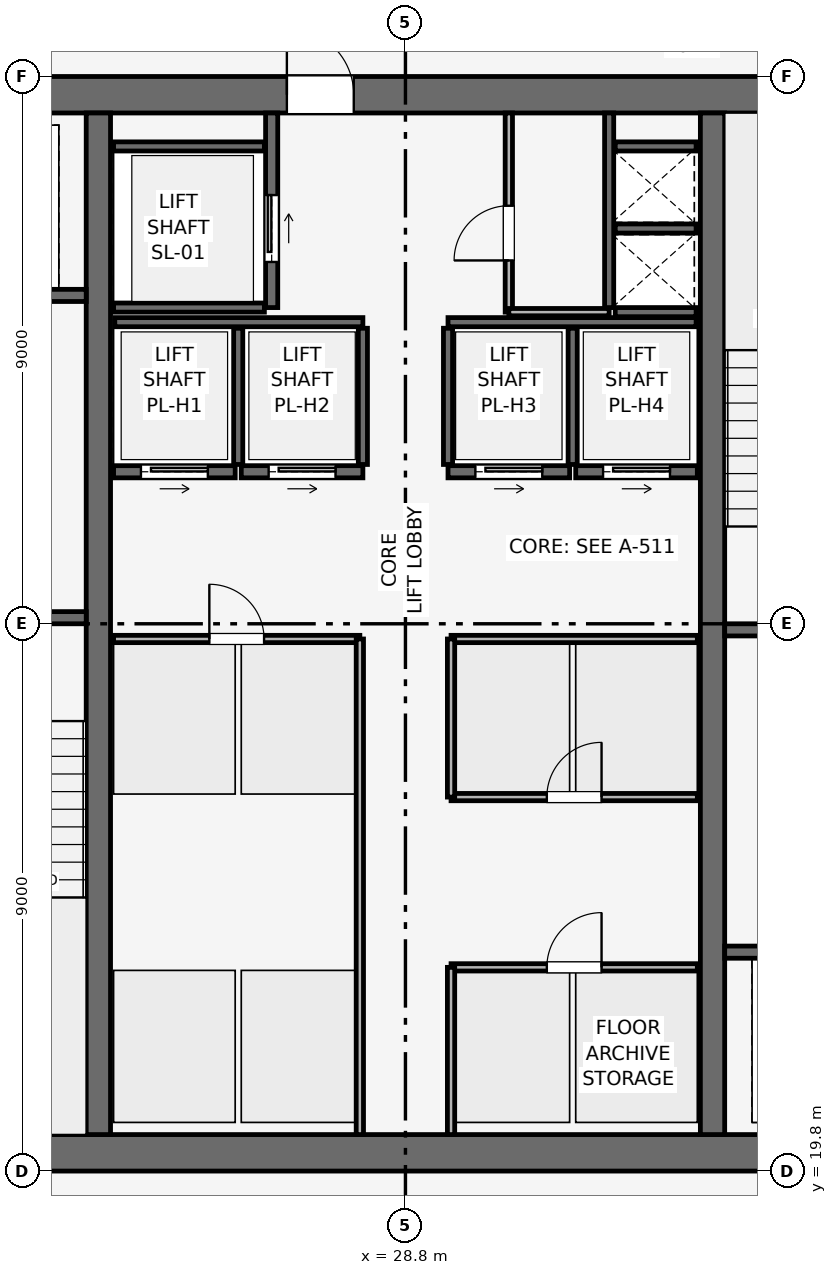
"""IFC4 building model, lengths in metres.
Left out: names, types, materials, properties, quantities, classifications, styles, units other than length and angle.
Written with IfcOpenShell. Run it as: python <this file> out.ifc"""

import sys

from ifc_helpers import new_model, si_unit, direction, frame, frame_2d, origin, place, context, subcontext, project, spatial, rectangle, extrude, element, fill, save


model = new_model("IFC4")
c1 = context("Model", 3, precision=1e-05, world=origin(), true_north=direction((0.0, 1.0)))
c2 = subcontext(c1, "Body", "Model", "MODEL_VIEW")
j1 = project(units=[si_unit("LENGTHUNIT", "METRE"), si_unit("PLANEANGLEUNIT", "RADIAN")], contexts=[c1])
p1 = place(None, origin())
s1 = spatial("IfcSite", under=j1, at=p1, CompositionType="ELEMENT")
p2 = place(p1, origin())
s2 = spatial("IfcBuilding", under=s1, at=p2, CompositionType="ELEMENT")
p3 = place(p2, frame((0.0, 0.0, 303.0)))
s3 = spatial("IfcBuildingStorey", under=s2, at=p3, CompositionType="ELEMENT", Elevation=303.0)
p4 = place(p3, frame((19.8, 20.1, 0.0), z_axis=(0.0, 0.0, 1.0), x_axis=(1.0, 0.0, 0.0)))
e1 = element("IfcWall", 1, at=p4, inside=s3, PredefinedType="SHEAR", context=c2, shape_type="SweptSolid", body=[
    extrude(rectangle(XDim=18.0, YDim=0.6, at=frame_2d((9.0, 0.0))), origin(), (0.0, 0.0, 1.0), 3.75),
])
p5 = place(p3, frame((19.8, 37.5, 0.0), z_axis=(0.0, 0.0, 1.0), x_axis=(1.0, 0.0, 0.0)))
e2 = element("IfcWall", 2, at=p5, inside=s3, PredefinedType="SHEAR", context=c2, shape_type="SweptSolid", body=[
    extrude(rectangle(XDim=18.0, YDim=0.6, at=frame_2d((9.0, 0.0))), origin(), (0.0, 0.0, 1.0), 3.75),
])
p6 = place(p5, frame((7.05, 0.0, 0.0)))
e3 = element("IfcOpeningElement", 3, at=p6, cuts=e2, PredefinedType="OPENING", context=c2, shape_type="SweptSolid", body=[
    extrude(rectangle(XDim=1.1, YDim=2.15, at=frame_2d((0.55, 1.075))), frame((0.0, 0.31, 0.0), z_axis=(0.0, -1.0, 0.0), x_axis=(1.0, 0.0, 0.0)), (0.0, 0.0, 1.0), 0.62),
])
for number, where, z_axis, x_axis in (
    (4, (23.75, 20.4, 0.0), (0.0, 0.0, 1.0), (0.0, 1.0, 0.0)),
    (5, (33.85, 20.4, 0.0), (0.0, 0.0, 1.0), (0.0, 1.0, 0.0)),
):
    element("IfcWall", number, at=place(p3, frame(where, z_axis=z_axis, x_axis=x_axis)), inside=s3, PredefinedType="SHEAR", context=c2, shape_type="SweptSolid", body=[
        extrude(rectangle(XDim=16.8, YDim=0.4, at=frame_2d((8.4, 0.0))), origin(), (0.0, 0.0, 1.0), 3.75),
    ])
p7 = place(p3, frame((20.4, 28.9, 0.0), z_axis=(0.0, 0.0, 1.0), x_axis=(1.0, 0.0, 0.0)))
e6 = element("IfcWall", 6, at=p7, inside=s3, PredefinedType="SHEAR", context=c2, shape_type="SweptSolid", body=[
    extrude(rectangle(XDim=3.15, YDim=0.2, at=frame_2d((1.575, 0.0))), origin(), (0.0, 0.0, 1.0), 3.51),
])
p8 = place(p7, frame((0.8, 0.0, 0.0)))
e7 = element("IfcOpeningElement", 7, at=p8, cuts=e6, PredefinedType="OPENING", context=c2, shape_type="SweptSolid", body=[
    extrude(rectangle(XDim=1.0, YDim=2.1, at=frame_2d((0.5, 1.05))), frame((0.0, 0.11, 0.0), z_axis=(0.0, -1.0, 0.0), x_axis=(1.0, 0.0, 0.0)), (0.0, 0.0, 1.0), 0.22),
])
p9 = place(p3, frame((34.05, 28.7, 0.0), z_axis=(0.0, 0.0, 1.0), x_axis=(1.0, 0.0, 0.0)))
e8 = element("IfcWall", 8, at=p9, inside=s3, PredefinedType="SHEAR", context=c2, shape_type="SweptSolid", body=[
    extrude(rectangle(XDim=3.15, YDim=0.2, at=frame_2d((1.575, 0.0))), origin(), (0.0, 0.0, 1.0), 3.51),
])
p10 = place(p9, frame((0.8, 0.0, 0.0)))
e9 = element("IfcOpeningElement", 9, at=p10, cuts=e8, PredefinedType="OPENING", context=c2, shape_type="SweptSolid", body=[
    extrude(rectangle(XDim=1.0, YDim=2.1, at=frame_2d((0.5, 1.05))), frame((0.0, 0.11, 0.0), z_axis=(0.0, -1.0, 0.0), x_axis=(1.0, 0.0, 0.0)), (0.0, 0.0, 1.0), 0.22),
])
p11 = place(p3, frame((32.15, 34.0, 0.0), z_axis=(0.0, 0.0, 1.0), x_axis=(0.0, 1.0, 0.0)))
e10 = element("IfcWall", 10, at=p11, inside=s3, PredefinedType="SHEAR", context=c2, shape_type="SweptSolid", body=[
    extrude(rectangle(XDim=3.2, YDim=0.15, at=frame_2d((1.6, 0.0))), origin(), (0.0, 0.0, 1.0), 3.51),
])
for number, where, z_axis, x_axis in (
    (11, (32.25, 33.925, 0.0), (0.0, 0.0, 1.0), (1.0, 0.0, 0.0)),
    (12, (32.25, 35.3, 0.0), (0.0, 0.0, 1.0), (1.0, 0.0, 0.0)),
):
    element("IfcWall", number, at=place(p3, frame(where, z_axis=z_axis, x_axis=x_axis)), inside=s3, PredefinedType="SHEAR", context=c2, shape_type="SweptSolid", body=[
        extrude(rectangle(XDim=1.33, YDim=0.15, at=frame_2d((0.665, 0.0))), origin(), (0.0, 0.0, 1.0), 3.51),
    ])
p12 = place(p3, frame((20.5, 34.2, 0.0), z_axis=(0.0, 0.0, 1.0), x_axis=(1.0, 0.0, 0.0)))
e13 = element("IfcWall", 13, at=p12, inside=s3, PredefinedType="SHEAR", context=c2, shape_type="SweptSolid", body=[
    extrude(rectangle(XDim=3.05, YDim=0.2, at=frame_2d((1.525, 0.0))), origin(), (0.0, 0.0, 1.0), 3.51),
])
p13 = place(p12, frame((0.75, 0.0, 0.0)))
e14 = element("IfcOpeningElement", 14, at=p13, cuts=e13, PredefinedType="OPENING", context=c2, shape_type="SweptSolid", body=[
    extrude(rectangle(XDim=1.1, YDim=2.15, at=frame_2d((0.55, 1.075))), frame((0.0, 0.11, 0.0), z_axis=(0.0, -1.0, 0.0), x_axis=(1.0, 0.0, 0.0)), (0.0, 0.0, 1.0), 0.22),
])
p14 = place(p3, frame((34.05, 23.4, 0.0), z_axis=(0.0, 0.0, 1.0), x_axis=(1.0, 0.0, 0.0)))
e15 = element("IfcWall", 15, at=p14, inside=s3, PredefinedType="SHEAR", context=c2, shape_type="SweptSolid", body=[
    extrude(rectangle(XDim=3.05, YDim=0.2, at=frame_2d((1.525, 0.0))), origin(), (0.0, 0.0, 1.0), 3.51),
])
p15 = place(p14, frame((1.2, 0.0, 0.0)))
e16 = element("IfcOpeningElement", 16, at=p15, cuts=e15, PredefinedType="OPENING", context=c2, shape_type="SweptSolid", body=[
    extrude(rectangle(XDim=1.1, YDim=2.15, at=frame_2d((0.55, 1.075))), frame((0.0, 0.11, 0.0), z_axis=(0.0, -1.0, 0.0), x_axis=(1.0, 0.0, 0.0)), (0.0, 0.0, 1.0), 0.22),
])
p16 = place(p3, frame((26.6, 34.0, 0.0), z_axis=(0.0, 0.0, 1.0), x_axis=(0.0, 1.0, 0.0)))
e17 = element("IfcWall", 17, at=p16, inside=s3, PredefinedType="SHEAR", context=c2, shape_type="SweptSolid", body=[
    extrude(rectangle(XDim=3.2, YDim=0.2, at=frame_2d((1.6, 0.0))), origin(), (0.0, 0.0, 1.0), 3.51),
])
p17 = place(p16, frame((0.75, 0.0, 0.0)))
e18 = element("IfcOpeningElement", 18, at=p17, cuts=e17, PredefinedType="OPENING", context=c2, shape_type="SweptSolid", body=[
    extrude(rectangle(XDim=1.1, YDim=2.15, at=frame_2d((0.55, 1.075))), frame((0.0, 0.11, 0.0), z_axis=(0.0, -1.0, 0.0), x_axis=(1.0, 0.0, 0.0)), (0.0, 0.0, 1.0), 0.22),
])
for number, where, z_axis, x_axis in (
    (19, (24.0, 34.0, 0.0), (0.0, 0.0, 1.0), (1.0, 0.0, 0.0)),
    (20, (24.0, 36.65, 0.0), (0.0, 0.0, 1.0), (1.0, 0.0, 0.0)),
):
    element("IfcWall", number, at=place(p3, frame(where, z_axis=z_axis, x_axis=x_axis)), inside=s3, PredefinedType="SHEAR", context=c2, shape_type="SweptSolid", body=[
        extrude(rectangle(XDim=2.48, YDim=0.15, at=frame_2d((1.24, 0.0))), origin(), (0.0, 0.0, 1.0), 3.51),
    ])
p18 = place(p3, frame((24.0, 31.3, 0.0), z_axis=(0.0, 0.0, 1.0), x_axis=(1.0, 0.0, 0.0)))
e21 = element("IfcWall", 21, at=p18, inside=s3, PredefinedType="SHEAR", context=c2, shape_type="SweptSolid", body=[
    extrude(rectangle(XDim=2.0, YDim=0.2, at=frame_2d((1.0, 0.0))), origin(), (0.0, 0.0, 1.0), 3.51),
])
p19 = place(p18, frame((0.45, 0.0, 0.0)))
e22 = element("IfcOpeningElement", 22, at=p19, cuts=e21, PredefinedType="OPENING", context=c2, shape_type="SweptSolid", body=[
    extrude(rectangle(XDim=1.1, YDim=2.15, at=frame_2d((0.55, 1.075))), frame((0.0, 0.11, 0.0), z_axis=(0.0, -1.0, 0.0), x_axis=(1.0, 0.0, 0.0)), (0.0, 0.0, 1.0), 0.22),
])
p20 = place(p3, frame((26.1, 31.3, 0.0), z_axis=(0.0, 0.0, 1.0), x_axis=(1.0, 0.0, 0.0)))
e23 = element("IfcWall", 23, at=p20, inside=s3, PredefinedType="SHEAR", context=c2, shape_type="SweptSolid", body=[
    extrude(rectangle(XDim=2.0, YDim=0.2, at=frame_2d((1.0, 0.0))), origin(), (0.0, 0.0, 1.0), 3.51),
])
p21 = place(p20, frame((0.45, 0.0, 0.0)))
e24 = element("IfcOpeningElement", 24, at=p21, cuts=e23, PredefinedType="OPENING", context=c2, shape_type="SweptSolid", body=[
    extrude(rectangle(XDim=1.1, YDim=2.15, at=frame_2d((0.55, 1.075))), frame((0.0, 0.11, 0.0), z_axis=(0.0, -1.0, 0.0), x_axis=(1.0, 0.0, 0.0)), (0.0, 0.0, 1.0), 0.22),
])
p22 = place(p3, frame((29.5, 31.3, 0.0), z_axis=(0.0, 0.0, 1.0), x_axis=(1.0, 0.0, 0.0)))
e25 = element("IfcWall", 25, at=p22, inside=s3, PredefinedType="SHEAR", context=c2, shape_type="SweptSolid", body=[
    extrude(rectangle(XDim=2.0, YDim=0.2, at=frame_2d((1.0, 0.0))), origin(), (0.0, 0.0, 1.0), 3.51),
])
p23 = place(p22, frame((0.45, 0.0, 0.0)))
e26 = element("IfcOpeningElement", 26, at=p23, cuts=e25, PredefinedType="OPENING", context=c2, shape_type="SweptSolid", body=[
    extrude(rectangle(XDim=1.1, YDim=2.15, at=frame_2d((0.55, 1.075))), frame((0.0, 0.11, 0.0), z_axis=(0.0, -1.0, 0.0), x_axis=(1.0, 0.0, 0.0)), (0.0, 0.0, 1.0), 0.22),
])
p24 = place(p3, frame((31.6, 31.3, 0.0), z_axis=(0.0, 0.0, 1.0), x_axis=(1.0, 0.0, 0.0)))
e27 = element("IfcWall", 27, at=p24, inside=s3, PredefinedType="SHEAR", context=c2, shape_type="SweptSolid", body=[
    extrude(rectangle(XDim=2.0, YDim=0.2, at=frame_2d((1.0, 0.0))), origin(), (0.0, 0.0, 1.0), 3.51),
])
p25 = place(p24, frame((0.45, 0.0, 0.0)))
e28 = element("IfcOpeningElement", 28, at=p25, cuts=e27, PredefinedType="OPENING", context=c2, shape_type="SweptSolid", body=[
    extrude(rectangle(XDim=1.1, YDim=2.15, at=frame_2d((0.55, 1.075))), frame((0.0, 0.11, 0.0), z_axis=(0.0, -1.0, 0.0), x_axis=(1.0, 0.0, 0.0)), (0.0, 0.0, 1.0), 0.22),
])
p26 = place(p3, frame((32.25, 36.65, 0.0), z_axis=(0.0, 0.0, 1.0), x_axis=(1.0, 0.0, 0.0)))
e29 = element("IfcWall", 29, at=p26, inside=s3, PredefinedType="SHEAR", context=c2, shape_type="SweptSolid", body=[
    extrude(rectangle(XDim=1.33, YDim=0.15, at=frame_2d((0.665, 0.0))), origin(), (0.0, 0.0, 1.0), 3.51),
])
for number, where, z_axis, x_axis in (
    (30, (24.02, 33.76, 0.0), (0.0, 0.0, 1.0), (1.0, 0.0, 0.0)),
    (31, (29.5, 33.76, 0.0), (0.0, 0.0, 1.0), (1.0, 0.0, 0.0)),
):
    element("IfcWall", number, at=place(p3, frame(where, z_axis=z_axis, x_axis=x_axis)), inside=s3, PredefinedType="SHEAR", context=c2, shape_type="SweptSolid", body=[
        extrude(rectangle(XDim=4.08, YDim=0.15, at=frame_2d((2.04, 0.0))), origin(), (0.0, 0.0, 1.0), 3.51),
    ])
for number, where, z_axis, x_axis in (
    (32, (26.05, 31.42, 0.0), (0.0, 0.0, 1.0), (0.0, 1.0, 0.0)),
    (33, (28.1, 31.42, 0.0), (0.0, 0.0, 1.0), (0.0, 1.0, 0.0)),
    (34, (29.5, 31.42, 0.0), (0.0, 0.0, 1.0), (0.0, 1.0, 0.0)),
    (35, (31.55, 31.42, 0.0), (0.0, 0.0, 1.0), (0.0, 1.0, 0.0)),
):
    element("IfcWall", number, at=place(p3, frame(where, z_axis=z_axis, x_axis=x_axis)), inside=s3, PredefinedType="SHEAR", context=c2, shape_type="SweptSolid", body=[
        extrude(rectangle(XDim=2.24, YDim=0.15, at=frame_2d((1.12, 0.0))), origin(), (0.0, 0.0, 1.0), 3.51),
    ])
p27 = place(p3, frame((30.5, 33.925, 0.0), z_axis=(0.0, 0.0, 1.0), x_axis=(0.0, 1.0, 0.0)))
e36 = element("IfcWall", 36, at=p27, inside=s3, PredefinedType="PARTITIONING", context=c2, shape_type="SweptSolid", body=[
    extrude(rectangle(XDim=3.275, YDim=0.12, at=frame_2d((1.637, 0.0))), origin(), (0.0, 0.0, 1.0), 3.51),
])
p28 = place(p27, frame((0.85, 0.0, 0.0)))
e37 = element("IfcOpeningElement", 37, at=p28, cuts=e36, PredefinedType="OPENING", context=c2, shape_type="SweptSolid", body=[
    extrude(rectangle(XDim=0.9, YDim=2.1, at=frame_2d((0.45, 1.05))), frame((0.0, 0.07, 0.0), z_axis=(0.0, -1.0, 0.0), x_axis=(1.0, 0.0, 0.0)), (0.0, 0.0, 1.0), 0.14),
])
p29 = place(p3, frame((30.5, 33.925, 0.0), z_axis=(0.0, 0.0, 1.0), x_axis=(1.0, 0.0, 0.0)))
e38 = element("IfcWall", 38, at=p29, inside=s3, PredefinedType="PARTITIONING", context=c2, shape_type="SweptSolid", body=[
    extrude(rectangle(XDim=1.65, YDim=0.12, at=frame_2d((0.825, 0.0))), origin(), (0.0, 0.0, 1.0), 3.51),
])
p30 = place(p3, frame((24.0, 28.55, 0.0), z_axis=(0.0, 0.0, 1.0), x_axis=(1.0, 0.0, 0.0)))
e39 = element("IfcWall", 39, at=p30, inside=s3, PredefinedType="PARTITIONING", context=c2, shape_type="SweptSolid", body=[
    extrude(rectangle(XDim=4.05, YDim=0.12, at=frame_2d((2.025, 0.0))), origin(), (0.0, 0.0, 1.0), 3.51),
])
p31 = place(p30, frame((1.575, 0.0, 0.0)))
e40 = element("IfcOpeningElement", 40, at=p31, cuts=e39, PredefinedType="OPENING", context=c2, shape_type="SweptSolid", body=[
    extrude(rectangle(XDim=0.9, YDim=2.1, at=frame_2d((0.45, 1.05))), frame((0.0, 0.07, 0.0), z_axis=(0.0, -1.0, 0.0), x_axis=(1.0, 0.0, 0.0)), (0.0, 0.0, 1.0), 0.14),
])
p32 = place(p3, frame((28.05, 20.4, 0.0), z_axis=(0.0, 0.0, 1.0), x_axis=(0.0, 1.0, 0.0)))
e41 = element("IfcWall", 41, at=p32, inside=s3, PredefinedType="PARTITIONING", context=c2, shape_type="SweptSolid", body=[
    extrude(rectangle(XDim=8.15, YDim=0.12, at=frame_2d((4.075, 0.0))), origin(), (0.0, 0.0, 1.0), 3.51),
])
p33 = place(p3, frame((29.55, 23.15, 0.0), z_axis=(0.0, 0.0, 1.0), x_axis=(1.0, 0.0, 0.0)))
e42 = element("IfcWall", 42, at=p33, inside=s3, PredefinedType="PARTITIONING", context=c2, shape_type="SweptSolid", body=[
    extrude(rectangle(XDim=4.05, YDim=0.12, at=frame_2d((2.025, 0.0))), origin(), (0.0, 0.0, 1.0), 3.51),
])
p34 = place(p33, frame((1.575, 0.0, 0.0)))
e43 = element("IfcOpeningElement", 43, at=p34, cuts=e42, PredefinedType="OPENING", context=c2, shape_type="SweptSolid", body=[
    extrude(rectangle(XDim=0.9, YDim=2.1, at=frame_2d((0.45, 1.05))), frame((0.0, 0.07, 0.0), z_axis=(0.0, -1.0, 0.0), x_axis=(1.0, 0.0, 0.0)), (0.0, 0.0, 1.0), 0.14),
])
p35 = place(p3, frame((29.55, 20.4, 0.0), z_axis=(0.0, 0.0, 1.0), x_axis=(0.0, 1.0, 0.0)))
e44 = element("IfcWall", 44, at=p35, inside=s3, PredefinedType="PARTITIONING", context=c2, shape_type="SweptSolid", body=[
    extrude(rectangle(XDim=2.75, YDim=0.12, at=frame_2d((1.375, 0.0))), origin(), (0.0, 0.0, 1.0), 3.51),
])
p36 = place(p3, frame((29.55, 25.95, 0.0), z_axis=(0.0, 0.0, 1.0), x_axis=(1.0, 0.0, 0.0)))
e45 = element("IfcWall", 45, at=p36, inside=s3, PredefinedType="PARTITIONING", context=c2, shape_type="SweptSolid", body=[
    extrude(rectangle(XDim=4.05, YDim=0.12, at=frame_2d((2.025, 0.0))), origin(), (0.0, 0.0, 1.0), 3.51),
])
p37 = place(p36, frame((1.575, 0.0, 0.0)))
e46 = element("IfcOpeningElement", 46, at=p37, cuts=e45, PredefinedType="OPENING", context=c2, shape_type="SweptSolid", body=[
    extrude(rectangle(XDim=0.9, YDim=2.1, at=frame_2d((0.45, 1.05))), frame((0.0, 0.07, 0.0), z_axis=(0.0, -1.0, 0.0), x_axis=(1.0, 0.0, 0.0)), (0.0, 0.0, 1.0), 0.14),
])
p38 = place(p3, frame((29.55, 28.55, 0.0), z_axis=(0.0, 0.0, 1.0), x_axis=(1.0, 0.0, 0.0)))
e47 = element("IfcWall", 47, at=p38, inside=s3, PredefinedType="PARTITIONING", context=c2, shape_type="SweptSolid", body=[
    extrude(rectangle(XDim=4.05, YDim=0.12, at=frame_2d((2.025, 0.0))), origin(), (0.0, 0.0, 1.0), 3.51),
])
p39 = place(p3, frame((29.55, 25.95, 0.0), z_axis=(0.0, 0.0, 1.0), x_axis=(0.0, 1.0, 0.0)))
e48 = element("IfcWall", 48, at=p39, inside=s3, PredefinedType="PARTITIONING", context=c2, shape_type="SweptSolid", body=[
    extrude(rectangle(XDim=2.6, YDim=0.12, at=frame_2d((1.3, 0.0))), origin(), (0.0, 0.0, 1.0), 3.51),
])
p40 = place(p17, origin())
e49 = element("IfcDoor", 49, at=p40, inside=s3, OperationType="SLIDING_TO_RIGHT", PredefinedType="DOOR", context=c2, shape_type="SweptSolid", body=[
    extrude(rectangle(XDim=1.1, YDim=2.15, at=frame_2d((0.55, 1.075))), frame((0.0, 0.025, 0.0), z_axis=(0.0, -1.0, 0.0), x_axis=(1.0, 0.0, 0.0)), (0.0, 0.0, 1.0), 0.05),
])
fill(e18, e49)
p41 = place(p19, origin())
e50 = element("IfcDoor", 50, at=p41, inside=s3, OperationType="SLIDING_TO_RIGHT", PredefinedType="DOOR", context=c2, shape_type="SweptSolid", body=[
    extrude(rectangle(XDim=1.1, YDim=2.15, at=frame_2d((0.55, 1.075))), frame((0.0, 0.025, 0.0), z_axis=(0.0, -1.0, 0.0), x_axis=(1.0, 0.0, 0.0)), (0.0, 0.0, 1.0), 0.05),
])
fill(e22, e50)
p42 = place(p21, origin())
e51 = element("IfcDoor", 51, at=p42, inside=s3, OperationType="SLIDING_TO_RIGHT", PredefinedType="DOOR", context=c2, shape_type="SweptSolid", body=[
    extrude(rectangle(XDim=1.1, YDim=2.15, at=frame_2d((0.55, 1.075))), frame((0.0, 0.025, 0.0), z_axis=(0.0, -1.0, 0.0), x_axis=(1.0, 0.0, 0.0)), (0.0, 0.0, 1.0), 0.05),
])
fill(e24, e51)
p43 = place(p23, origin())
e52 = element("IfcDoor", 52, at=p43, inside=s3, OperationType="SLIDING_TO_RIGHT", PredefinedType="DOOR", context=c2, shape_type="SweptSolid", body=[
    extrude(rectangle(XDim=1.1, YDim=2.15, at=frame_2d((0.55, 1.075))), frame((0.0, 0.025, 0.0), z_axis=(0.0, -1.0, 0.0), x_axis=(1.0, 0.0, 0.0)), (0.0, 0.0, 1.0), 0.05),
])
fill(e26, e52)
p44 = place(p25, origin())
e53 = element("IfcDoor", 53, at=p44, inside=s3, OperationType="SLIDING_TO_RIGHT", PredefinedType="DOOR", context=c2, shape_type="SweptSolid", body=[
    extrude(rectangle(XDim=1.1, YDim=2.15, at=frame_2d((0.55, 1.075))), frame((0.0, 0.025, 0.0), z_axis=(0.0, -1.0, 0.0), x_axis=(1.0, 0.0, 0.0)), (0.0, 0.0, 1.0), 0.05),
])
fill(e28, e53)
p45 = place(p28, origin())
e54 = element("IfcDoor", 54, at=p45, inside=s3, OperationType="SINGLE_SWING_LEFT", PredefinedType="DOOR", context=c2, shape_type="SweptSolid", body=[
    extrude(rectangle(XDim=0.9, YDim=2.1, at=frame_2d((0.45, 1.05))), frame((0.0, 0.025, 0.0), z_axis=(0.0, -1.0, 0.0), x_axis=(1.0, 0.0, 0.0)), (0.0, 0.0, 1.0), 0.05),
])
fill(e37, e54)
p46 = place(p31, origin())
e55 = element("IfcDoor", 55, at=p46, inside=s3, OperationType="SINGLE_SWING_LEFT", PredefinedType="DOOR", context=c2, shape_type="SweptSolid", body=[
    extrude(rectangle(XDim=0.9, YDim=2.1, at=frame_2d((0.45, 1.05))), frame((0.0, 0.025, 0.0), z_axis=(0.0, -1.0, 0.0), x_axis=(1.0, 0.0, 0.0)), (0.0, 0.0, 1.0), 0.05),
])
fill(e40, e55)
p47 = place(p34, origin())
e56 = element("IfcDoor", 56, at=p47, inside=s3, OperationType="SINGLE_SWING_RIGHT", PredefinedType="DOOR", context=c2, shape_type="SweptSolid", body=[
    extrude(rectangle(XDim=0.9, YDim=2.1, at=frame_2d((0.45, 1.05))), frame((0.0, 0.025, 0.0), z_axis=(0.0, -1.0, 0.0), x_axis=(1.0, 0.0, 0.0)), (0.0, 0.0, 1.0), 0.05),
])
fill(e43, e56)
p48 = place(p37, origin())
e57 = element("IfcDoor", 57, at=p48, inside=s3, OperationType="SINGLE_SWING_RIGHT", PredefinedType="DOOR", context=c2, shape_type="SweptSolid", body=[
    extrude(rectangle(XDim=0.9, YDim=2.1, at=frame_2d((0.45, 1.05))), frame((0.0, 0.025, 0.0), z_axis=(0.0, -1.0, 0.0), x_axis=(1.0, 0.0, 0.0)), (0.0, 0.0, 1.0), 0.05),
])
fill(e46, e57)
p49 = place(p6, origin())
e58 = element("IfcDoor", 58, at=p49, inside=s3, OperationType="SINGLE_SWING_LEFT", PredefinedType="DOOR", context=c2, shape_type="SweptSolid", body=[
    extrude(rectangle(XDim=1.1, YDim=2.15, at=frame_2d((0.55, 1.075))), frame((0.0, 0.025, 0.0), z_axis=(0.0, -1.0, 0.0), x_axis=(1.0, 0.0, 0.0)), (0.0, 0.0, 1.0), 0.05),
])
fill(e3, e58)
save(model, sys.argv[1])
